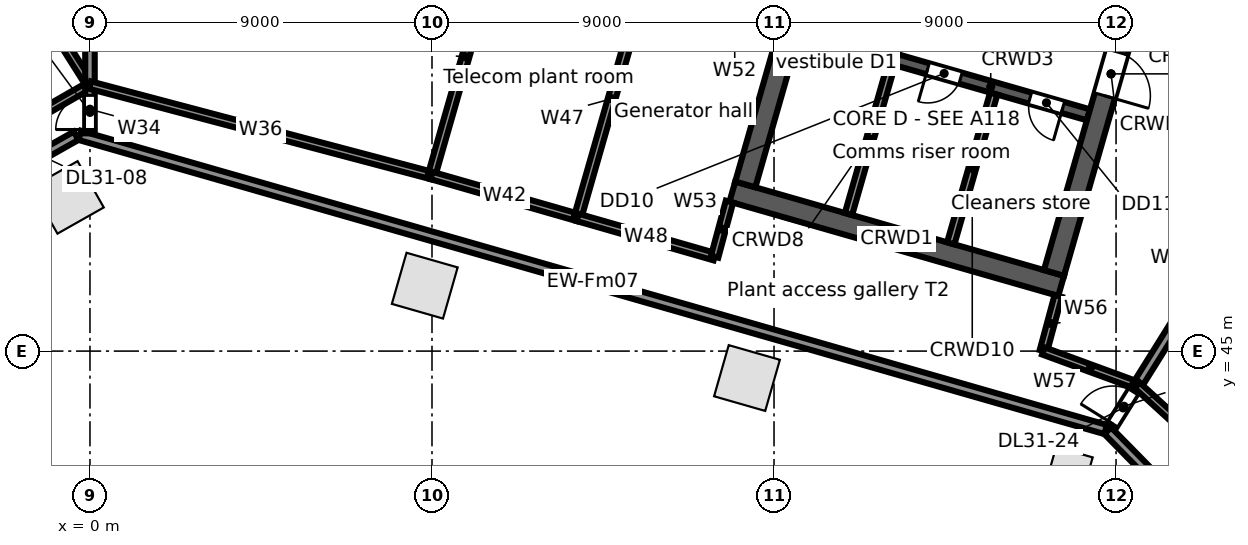
"""IFC4 building model, lengths in metres.
Left out: names, types, materials, properties, quantities, classifications, styles, units other than length and angle.
Written with IfcOpenShell. Run it as: python <this file> out.ifc"""

import sys

from ifc_helpers import new_model, si_unit, direction, frame, frame_2d, origin, origin_2d, place, context, subcontext, project, spatial, rectangle, extrude, element, fill, save


model = new_model("IFC4")
c1 = context("Model", 3, precision=1e-05, world=origin(), true_north=direction((0.0, 1.0)))
c2 = subcontext(c1, "Body", "Model", "MODEL_VIEW")
j1 = project(units=[si_unit("LENGTHUNIT", "METRE"), si_unit("PLANEANGLEUNIT", "RADIAN")], contexts=[c1])
p1 = place(None, origin())
s1 = spatial("IfcSite", under=j1, at=p1, CompositionType="ELEMENT")
p2 = place(p1, origin())
s2 = spatial("IfcBuilding", under=s1, at=p2, CompositionType="ELEMENT")
p3 = place(p2, frame((0.0, 0.0, 149.9)))
s3 = spatial("IfcBuildingStorey", under=s2, at=p3, CompositionType="ELEMENT", Elevation=149.9)
for number, where, z_axis, x_axis in (
    (1, (-0.591, 49.044, 0.0), (0.0, 0.0, 1.0), (0.87, 0.492, 0.0)),
    (2, (8.81, 46.722, 0.0), (0.0, 0.0, 1.0), (0.961, -0.276, 0.0)),
    (3, (17.288, 44.291, 0.0), (0.0, 0.0, 1.0), (0.961, -0.276, 0.0)),
):
    element("IfcColumn", number, at=place(p3, frame(where, z_axis=z_axis, x_axis=x_axis)), inside=s3, PredefinedType="COLUMN", context=c2, shape_type="SweptSolid", body=[
        extrude(rectangle(XDim=1.4, YDim=1.4, at=origin_2d()), origin(), (0.0, 0.0, 1.0), 5.0),
    ])
p4 = place(p3, frame((25.767, 41.86, 0.0), z_axis=(0.0, 0.0, 1.0), x_axis=(0.961261695938, -0.275637355817, 0.0)))
e4 = element("IfcColumn", 4, at=p4, inside=s3, PredefinedType="COLUMN", context=c2, shape_type="SweptSolid", body=[
    extrude(rectangle(XDim=1.0, YDim=1.0, at=origin_2d()), origin(), (0.0, 0.0, 1.0), 4.68),
])
p5 = place(p3, frame((-0.364, 50.666, 0.0), z_axis=(0.0, 0.0, 1.0), x_axis=(-0.870355021882, -0.492424751494, 0.0)))
e5 = element("IfcWall", 5, at=p5, inside=s3, PredefinedType="STANDARD", context=c2, shape_type="SweptSolid", body=[
    extrude(rectangle(XDim=44.126, YDim=0.25, at=frame_2d((22.063, 0.0))), origin(), (0.0, 0.0, 1.0), 3.768),
])
p6 = place(p3, frame((26.726, 42.937, 0.0), z_axis=(0.0, 0.0, 1.0), x_axis=(-0.96126039977, 0.275641876052, 0.0)))
e6 = element("IfcWall", 6, at=p6, inside=s3, PredefinedType="STANDARD", context=c2, shape_type="SweptSolid", body=[
    extrude(rectangle(XDim=28.083, YDim=0.25, at=frame_2d((14.041, 0.0))), origin(), (0.0, 0.0, 1.0), 3.768),
])
p7 = place(p3, frame((39.897, 29.558, 0.0), z_axis=(0.0, 0.0, 1.0), x_axis=(-0.700908640523, 0.713251062137, 0.0)))
e7 = element("IfcWall", 7, at=p7, inside=s3, PredefinedType="STANDARD", context=c2, shape_type="SweptSolid", body=[
    extrude(rectangle(XDim=18.712, YDim=0.25, at=frame_2d((9.356, 0.0))), origin(), (0.0, 0.0, 1.0), 4.68),
])
p8 = place(p3, frame((16.904, 49.197, 0.0), z_axis=(0.0, 0.0, 1.0), x_axis=(0.96126248289, -0.275634611374, 0.0)))
e8 = element("IfcWall", 8, at=p8, inside=s3, PredefinedType="SOLIDWALL", context=c2, shape_type="SweptSolid", body=[
    extrude(rectangle(XDim=9.0, YDim=0.55, at=frame_2d((4.5, 0.0))), origin(), (0.0, 0.0, 1.0), 4.68),
])
p9 = place(p3, frame((18.68, 53.396, 0.0), z_axis=(0.0, 0.0, 1.0), x_axis=(0.961234387647, -0.275732573349, 0.0)))
e9 = element("IfcWall", 9, at=p9, inside=s3, PredefinedType="SOLIDWALL", context=c2, shape_type="SweptSolid", body=[
    extrude(rectangle(XDim=2.55, YDim=0.2, at=frame_2d((1.275, 0.0))), origin(), (0.0, 0.0, 1.0), 4.68),
])
p10 = place(p3, frame((21.131, 52.692, 0.0), z_axis=(0.0, 0.0, 1.0), x_axis=(0.961265220997, -0.27562506218, 0.0)))
e10 = element("IfcWall", 10, at=p10, inside=s3, PredefinedType="SOLIDWALL", context=c2, shape_type="SweptSolid", body=[
    extrude(rectangle(XDim=5.35, YDim=0.3, at=frame_2d((2.675, 0.0))), origin(), (0.0, 0.0, 1.0), 4.68),
])
p11 = place(p10, frame((0.95, 0.0, 0.0)))
e11 = element("IfcOpeningElement", 11, at=p11, cuts=e10, PredefinedType="OPENING", context=c2, shape_type="SweptSolid", body=[
    extrude(rectangle(XDim=0.9, YDim=2.1, at=frame_2d((0.45, 1.05))), frame((0.0, 0.16, 0.0), z_axis=(0.0, -1.0, 0.0), x_axis=(1.0, 0.0, 0.0)), (0.0, 0.0, 1.0), 0.32),
])
p12 = place(p10, frame((3.75, 0.0, 0.0)))
e12 = element("IfcOpeningElement", 12, at=p12, cuts=e10, PredefinedType="OPENING", context=c2, shape_type="SweptSolid", body=[
    extrude(rectangle(XDim=0.9, YDim=2.1, at=frame_2d((0.45, 1.05))), frame((0.0, 0.16, 0.0), z_axis=(0.0, -1.0, 0.0), x_axis=(1.0, 0.0, 0.0)), (0.0, 0.0, 1.0), 0.32),
])
p13 = place(p3, frame((17.244, 49.386, 0.0), z_axis=(0.0, 0.0, 1.0), x_axis=(0.275632146085, 0.96126318979, 0.0)))
e13 = element("IfcWall", 13, at=p13, inside=s3, PredefinedType="SOLIDWALL", context=c2, shape_type="SweptSolid", body=[
    extrude(rectangle(XDim=10.9, YDim=0.55, at=frame_2d((5.45, 0.0))), origin(), (0.0, 0.0, 1.0), 4.68),
])
p14 = place(p13, frame((4.85, 0.0, 0.0)))
e14 = element("IfcOpeningElement", 14, at=p14, cuts=e13, PredefinedType="OPENING", context=c2, shape_type="SweptSolid", body=[
    extrude(rectangle(XDim=1.2, YDim=2.1, at=frame_2d((0.6, 1.05))), frame((0.0, 0.285, 0.0), z_axis=(0.0, -1.0, 0.0), x_axis=(1.0, 0.0, 0.0)), (0.0, 0.0, 1.0), 0.57),
])
p15 = place(p3, frame((19.959, 48.607, 0.0), z_axis=(0.0, 0.0, 1.0), x_axis=(0.275641165445, 0.961260603537, 0.0)))
e15 = element("IfcWall", 15, at=p15, inside=s3, PredefinedType="SOLIDWALL", context=c2, shape_type="SweptSolid", body=[
    extrude(rectangle(XDim=4.1, YDim=0.2, at=frame_2d((2.05, 0.0))), origin(), (0.0, 0.0, 1.0), 4.68),
])
p16 = place(p3, frame((21.172, 52.837, 0.0), z_axis=(0.0, 0.0, 1.0), x_axis=(0.275657676022, 0.961255868981, 0.0)))
e16 = element("IfcWall", 16, at=p16, inside=s3, PredefinedType="PARTITIONING", context=c2, shape_type="SweptSolid", body=[
    extrude(rectangle(XDim=2.1, YDim=0.2, at=frame_2d((1.05, 0.0))), origin(), (0.0, 0.0, 1.0), 4.68),
])
p17 = place(p16, frame((0.55, 0.0, 0.0)))
e17 = element("IfcOpeningElement", 17, at=p17, cuts=e16, PredefinedType="OPENING", context=c2, shape_type="SweptSolid", body=[
    extrude(rectangle(XDim=1.0, YDim=2.1, at=frame_2d((0.5, 1.05))), frame((0.0, 0.11, 0.0), z_axis=(0.0, -1.0, 0.0), x_axis=(1.0, 0.0, 0.0)), (0.0, 0.0, 1.0), 0.22),
])
p18 = place(p3, frame((22.651, 47.835, 0.0), z_axis=(0.0, 0.0, 1.0), x_axis=(0.275625388668, 0.961265127383, 0.0)))
e18 = element("IfcWall", 18, at=p18, inside=s3, PredefinedType="PARTITIONING", context=c2, shape_type="SweptSolid", body=[
    extrude(rectangle(XDim=4.1, YDim=0.2, at=frame_2d((2.05, 0.0))), origin(), (0.0, 0.0, 1.0), 4.68),
])
p19 = place(p3, frame((25.366, 47.057, 0.0), z_axis=(0.0, 0.0, 1.0), x_axis=(0.275632146085, 0.96126318979, 0.0)))
e19 = element("IfcWall", 19, at=p19, inside=s3, PredefinedType="SOLIDWALL", context=c2, shape_type="SweptSolid", body=[
    extrude(rectangle(XDim=10.9, YDim=0.55, at=frame_2d((5.45, 0.0))), origin(), (0.0, 0.0, 1.0), 4.68),
])
p20 = place(p19, frame((4.85, 0.0, 0.0)))
e20 = element("IfcOpeningElement", 20, at=p20, cuts=e19, PredefinedType="OPENING", context=c2, shape_type="SweptSolid", body=[
    extrude(rectangle(XDim=1.2, YDim=2.1, at=frame_2d((0.6, 1.05))), frame((0.0, 0.285, 0.0), z_axis=(0.0, -1.0, 0.0), x_axis=(1.0, 0.0, 0.0)), (0.0, 0.0, 1.0), 0.57),
])
p21 = place(p3, frame((-7.196, 63.397, 0.0), z_axis=(0.0, 0.0, 1.0), x_axis=(0.533884631006, -0.845557331454, 0.0)))
e21 = element("IfcWall", 21, at=p21, inside=s3, PredefinedType="PARTITIONING", context=c2, shape_type="SweptSolid", body=[
    extrude(rectangle(XDim=13.479, YDim=0.2, at=frame_2d((6.739, 0.0))), origin(), (0.0, 0.0, 1.0), 3.748),
])
p22 = place(p3, frame((-4.821, 49.23, 0.0), z_axis=(0.0, 0.0, 1.0), x_axis=(0.867068012741, 0.498189784401, 0.0)))
e22 = element("IfcWall", 22, at=p22, inside=s3, PredefinedType="PARTITIONING", context=c2, shape_type="SweptSolid", body=[
    extrude(rectangle(XDim=5.56, YDim=0.2, at=frame_2d((2.78, 0.0))), origin(), (0.0, 0.0, 1.0), 3.748),
])
p23 = place(p22, frame((1.95, 0.0, 0.0)))
e23 = element("IfcOpeningElement", 23, at=p23, cuts=e22, PredefinedType="OPENING", context=c2, shape_type="SweptSolid", body=[
    extrude(rectangle(XDim=1.8, YDim=2.1, at=frame_2d((0.9, 1.05))), frame((0.0, 0.11, 0.0), z_axis=(0.0, -1.0, 0.0), x_axis=(1.0, 0.0, 0.0)), (0.0, 0.0, 1.0), 0.22),
])
p24 = place(p3, frame((0.0, 50.731, 0.0), z_axis=(0.0, 0.0, 1.0), x_axis=(0.0, 1.0, 0.0)))
e24 = element("IfcWall", 24, at=p24, inside=s3, PredefinedType="PARTITIONING", context=c2, shape_type="SweptSolid", body=[
    extrude(rectangle(XDim=1.269, YDim=0.25, at=frame_2d((0.635, 0.0))), origin(), (0.0, 0.0, 1.0), 4.68),
])
p25 = place(p24, frame((0.1, 0.0, 0.0)))
e25 = element("IfcOpeningElement", 25, at=p25, cuts=e24, PredefinedType="OPENING", context=c2, shape_type="SweptSolid", body=[
    extrude(rectangle(XDim=0.9, YDim=2.1, at=frame_2d((0.45, 1.05))), frame((0.0, 0.135, 0.0), z_axis=(0.0, -1.0, 0.0), x_axis=(1.0, 0.0, 0.0)), (0.0, 0.0, 1.0), 0.27),
])
p26 = place(p3, frame((0.0, 52.0, 0.0), z_axis=(0.0, 0.0, 1.0), x_axis=(0.0, 1.0, 0.0)))
e26 = element("IfcWall", 26, at=p26, inside=s3, PredefinedType="PARTITIONING", context=c2, shape_type="SweptSolid", body=[
    extrude(rectangle(XDim=7.15, YDim=0.25, at=frame_2d((3.575, 0.0))), origin(), (0.0, 0.0, 1.0), 4.68),
])
p27 = place(p3, frame((0.0, 52.0, 0.0), z_axis=(0.0, 0.0, 1.0), x_axis=(0.966705801065, -0.255890394871, 0.0)))
e27 = element("IfcWall", 27, at=p27, inside=s3, PredefinedType="PARTITIONING", context=c2, shape_type="SweptSolid", body=[
    extrude(rectangle(XDim=9.297, YDim=0.2, at=frame_2d((4.648, 0.0))), origin(), (0.0, 0.0, 1.0), 3.86),
])
p28 = place(p3, frame((8.987, 49.621, 0.0), z_axis=(0.0, 0.0, 1.0), x_axis=(0.275703259795, 0.961242795832, 0.0)))
e28 = element("IfcWall", 28, at=p28, inside=s3, PredefinedType="PARTITIONING", context=c2, shape_type="SweptSolid", body=[
    extrude(rectangle(XDim=6.5, YDim=0.2, at=frame_2d((3.25, 0.0))), origin(), (0.0, 0.0, 1.0), 3.86),
])
p29 = place(p3, frame((8.987, 49.621, 0.0), z_axis=(0.0, 0.0, 1.0), x_axis=(0.961228587008, -0.275752794216, 0.0)))
e29 = element("IfcWall", 29, at=p29, inside=s3, PredefinedType="PARTITIONING", context=c2, shape_type="SweptSolid", body=[
    extrude(rectangle(XDim=4.0, YDim=0.2, at=frame_2d((2.0, 0.0))), origin(), (0.0, 0.0, 1.0), 3.748),
])
p30 = place(p3, frame((12.832, 48.518, 0.0), z_axis=(0.0, 0.0, 1.0), x_axis=(0.275693305607, 0.961245650832, 0.0)))
e30 = element("IfcWall", 30, at=p30, inside=s3, PredefinedType="PARTITIONING", context=c2, shape_type="SweptSolid", body=[
    extrude(rectangle(XDim=6.5, YDim=0.2, at=frame_2d((3.25, 0.0))), origin(), (0.0, 0.0, 1.0), 4.68),
])
p31 = place(p3, frame((12.832, 48.518, 0.0), z_axis=(0.0, 0.0, 1.0), x_axis=(0.961228613303, -0.275752702557, 0.0)))
e31 = element("IfcWall", 31, at=p31, inside=s3, PredefinedType="PARTITIONING", context=c2, shape_type="SweptSolid", body=[
    extrude(rectangle(XDim=3.75, YDim=0.2, at=frame_2d((1.875, 0.0))), origin(), (0.0, 0.0, 1.0), 4.68),
])
p32 = place(p3, frame((16.437, 47.484, 0.0), z_axis=(0.0, 0.0, 1.0), x_axis=(0.260405090968, 0.965499450335, 0.0)))
e32 = element("IfcWall", 32, at=p32, inside=s3, PredefinedType="PARTITIONING", context=c2, shape_type="SweptSolid", body=[
    extrude(rectangle(XDim=1.501, YDim=0.2, at=frame_2d((0.75, 0.0))), origin(), (0.0, 0.0, 1.0), 4.68),
])
p33 = place(p3, frame((25.088, 45.004, 0.0), z_axis=(0.0, 0.0, 1.0), x_axis=(0.260761429939, 0.965403271517, 0.0)))
e33 = element("IfcWall", 33, at=p33, inside=s3, PredefinedType="PARTITIONING", context=c2, shape_type="SweptSolid", body=[
    extrude(rectangle(XDim=1.5, YDim=0.2, at=frame_2d((0.75, 0.0))), origin(), (0.0, 0.0, 1.0), 4.68),
])
p34 = place(p3, frame((25.088, 45.004, 0.0), z_axis=(0.0, 0.0, 1.0), x_axis=(0.93889532653, -0.344202797519, 0.0)))
e34 = element("IfcWall", 34, at=p34, inside=s3, PredefinedType="PARTITIONING", context=c2, shape_type="SweptSolid", body=[
    extrude(rectangle(XDim=2.629, YDim=0.2, at=frame_2d((1.314, 0.0))), origin(), (0.0, 0.0, 1.0), 3.852),
])
p35 = place(p3, frame((26.867, 42.996, 0.0), z_axis=(0.0, 0.0, 1.0), x_axis=(0.529762680017, 0.848145920736, 0.0)))
e35 = element("IfcWall", 35, at=p35, inside=s3, PredefinedType="PARTITIONING", context=c2, shape_type="SweptSolid", body=[
    extrude(rectangle(XDim=1.301, YDim=0.25, at=frame_2d((0.65, 0.0))), origin(), (0.0, 0.0, 1.0), 4.68),
])
p36 = place(p35, frame((0.1, 0.0, 0.0)))
e36 = element("IfcOpeningElement", 36, at=p36, cuts=e35, PredefinedType="OPENING", context=c2, shape_type="SweptSolid", body=[
    extrude(rectangle(XDim=1.0, YDim=2.1, at=frame_2d((0.5, 1.05))), frame((0.0, 0.135, 0.0), z_axis=(0.0, -1.0, 0.0), x_axis=(1.0, 0.0, 0.0)), (0.0, 0.0, 1.0), 0.27),
])
p37 = place(p3, frame((27.556, 44.099, 0.0), z_axis=(0.0, 0.0, 1.0), x_axis=(0.529908011914, 0.848055127282, 0.0)))
e37 = element("IfcWall", 37, at=p37, inside=s3, PredefinedType="PARTITIONING", context=c2, shape_type="SweptSolid", body=[
    extrude(rectangle(XDim=6.999, YDim=0.25, at=frame_2d((3.5, 0.0))), origin(), (0.0, 0.0, 1.0), 4.68),
])
p38 = place(p3, frame((27.556, 44.099, 0.0), z_axis=(0.0, 0.0, 1.0), x_axis=(0.737709390417, -0.675118400942, 0.0)))
e38 = element("IfcWall", 38, at=p38, inside=s3, PredefinedType="PARTITIONING", context=c2, shape_type="SweptSolid", body=[
    extrude(rectangle(XDim=5.254, YDim=0.2, at=frame_2d((2.627, 0.0))), origin(), (0.0, 0.0, 1.0), 4.68),
])
p39 = place(p20, frame((1.2, 0.0, 0.0), z_axis=(0.0, 0.0, 1.0), x_axis=(-1.0, 0.0, 0.0)))
e39 = element("IfcDoor", 39, at=p39, inside=s3, OperationType="SINGLE_SWING_RIGHT", PredefinedType="DOOR", context=c2, shape_type="SweptSolid", body=[
    extrude(rectangle(XDim=1.2, YDim=2.1, at=frame_2d((0.6, 1.05))), frame((0.0, 0.025, 0.0), z_axis=(0.0, -1.0, 0.0), x_axis=(1.0, 0.0, 0.0)), (0.0, 0.0, 1.0), 0.05),
])
fill(e20, e39)
p40 = place(p11, frame((0.9, 0.0, 0.0), z_axis=(0.0, 0.0, 1.0), x_axis=(-1.0, 0.0, 0.0)))
e40 = element("IfcDoor", 40, at=p40, inside=s3, OperationType="SINGLE_SWING_RIGHT", PredefinedType="DOOR", context=c2, shape_type="SweptSolid", body=[
    extrude(rectangle(XDim=0.9, YDim=2.1, at=frame_2d((0.45, 1.05))), frame((0.0, 0.025, 0.0), z_axis=(0.0, -1.0, 0.0), x_axis=(1.0, 0.0, 0.0)), (0.0, 0.0, 1.0), 0.05),
])
fill(e11, e40)
p41 = place(p12, frame((0.9, 0.0, 0.0), z_axis=(0.0, 0.0, 1.0), x_axis=(-1.0, 0.0, 0.0)))
e41 = element("IfcDoor", 41, at=p41, inside=s3, OperationType="SINGLE_SWING_LEFT", PredefinedType="DOOR", context=c2, shape_type="SweptSolid", body=[
    extrude(rectangle(XDim=0.9, YDim=2.1, at=frame_2d((0.45, 1.05))), frame((0.0, 0.025, 0.0), z_axis=(0.0, -1.0, 0.0), x_axis=(1.0, 0.0, 0.0)), (0.0, 0.0, 1.0), 0.05),
])
fill(e12, e41)
p42 = place(p25, origin())
e42 = element("IfcDoor", 42, at=p42, inside=s3, OperationType="SINGLE_SWING_LEFT", PredefinedType="DOOR", context=c2, shape_type="SweptSolid", body=[
    extrude(rectangle(XDim=0.9, YDim=2.1, at=frame_2d((0.45, 1.05))), frame((0.0, 0.025, 0.0), z_axis=(0.0, -1.0, 0.0), x_axis=(1.0, 0.0, 0.0)), (0.0, 0.0, 1.0), 0.05),
])
fill(e25, e42)
p43 = place(p36, origin())
e43 = element("IfcDoor", 43, at=p43, inside=s3, OperationType="SINGLE_SWING_LEFT", PredefinedType="DOOR", context=c2, shape_type="SweptSolid", body=[
    extrude(rectangle(XDim=1.0, YDim=2.1, at=frame_2d((0.5, 1.05))), frame((0.0, 0.025, 0.0), z_axis=(0.0, -1.0, 0.0), x_axis=(1.0, 0.0, 0.0)), (0.0, 0.0, 1.0), 0.05),
])
fill(e36, e43)
save(model, sys.argv[1])
